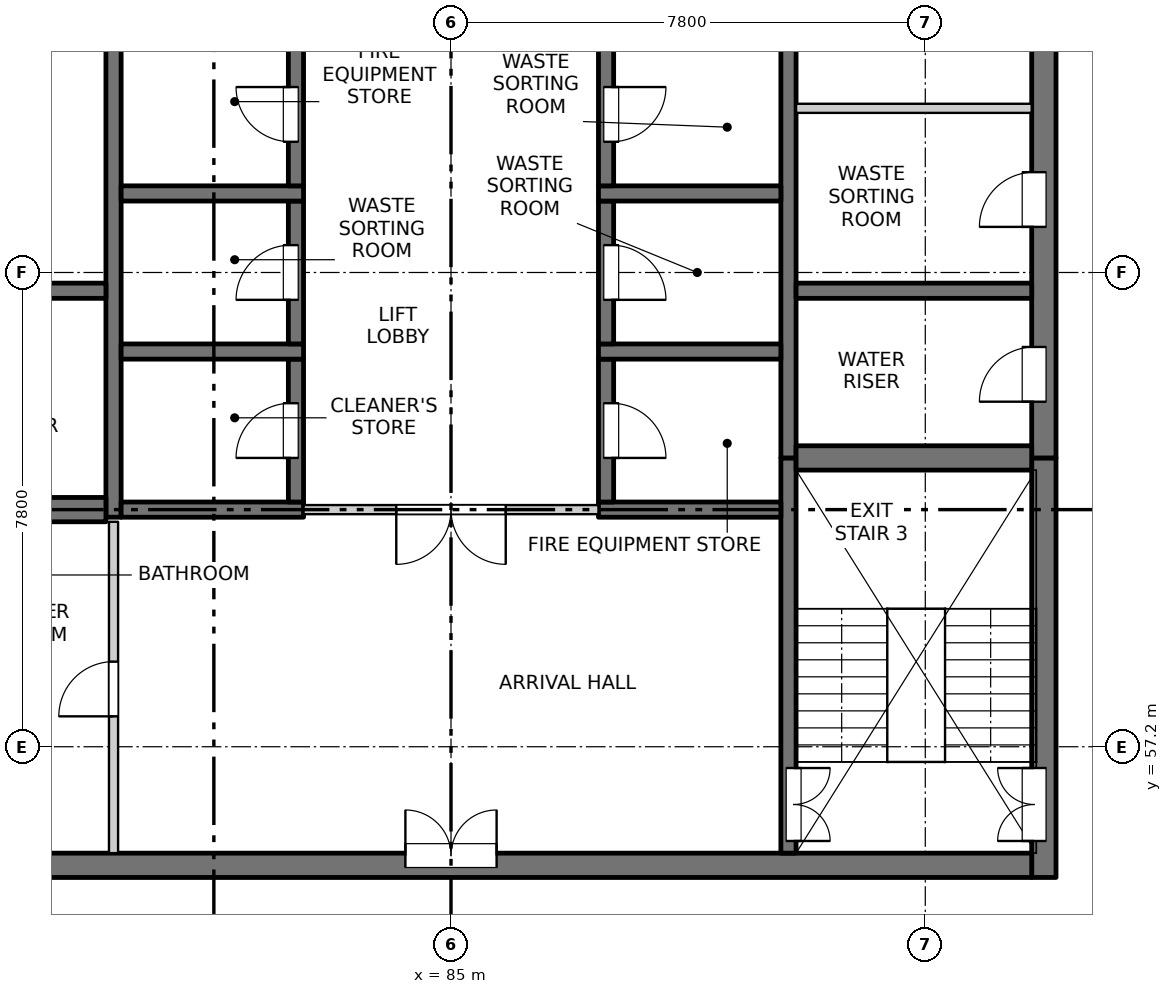
"""IFC4 building model, lengths in metres.
Left out: names, types, materials, properties, quantities, classifications, styles, units other than length and angle.
Written with IfcOpenShell. Run it as: python <this file> out.ifc"""

import sys

from ifc_helpers import new_model, si_unit, direction, frame, frame_2d, origin, place, context, subcontext, project, spatial, rectangle, extrude, element, fill, save


model = new_model("IFC4")
c1 = context("Model", 3, precision=1e-05, world=origin(), true_north=direction((0.0, 1.0)))
c2 = subcontext(c1, "Body", "Model", "MODEL_VIEW")
j1 = project(units=[si_unit("LENGTHUNIT", "METRE"), si_unit("PLANEANGLEUNIT", "RADIAN")], contexts=[c1])
p1 = place(None, origin())
s1 = spatial("IfcSite", under=j1, at=p1, CompositionType="ELEMENT")
p2 = place(p1, origin())
s2 = spatial("IfcBuilding", under=s1, at=p2, CompositionType="ELEMENT")
p3 = place(p2, frame((0.0, 0.0, 214.3)))
s3 = spatial("IfcBuildingStorey", under=s2, at=p3, CompositionType="ELEMENT", Elevation=214.3)
p4 = place(p3, frame((94.75, 55.05, -0.25), z_axis=(0.0, 0.0, 1.0), x_axis=(0.0, 1.0, 0.0)))
e1 = element("IfcWall", 1, at=p4, inside=s3, PredefinedType="SOLIDWALL", context=c2, shape_type="SweptSolid", body=[
    extrude(rectangle(XDim=6.9, YDim=0.4, at=frame_2d((3.45, 0.0))), origin(), (0.0, 0.0, 1.0), 3.4),
])
p5 = place(p4, frame((0.6, 0.0, 0.25)))
e2 = element("IfcOpeningElement", 2, at=p5, cuts=e1, PredefinedType="OPENING", context=c2, shape_type="SweptSolid", body=[
    extrude(rectangle(XDim=1.2, YDim=2.1, at=frame_2d((0.6, 1.05))), frame((0.0, 0.21, 0.0), z_axis=(0.0, -1.0, 0.0), x_axis=(1.0, 0.0, 0.0)), (0.0, 0.0, 1.0), 0.42),
])
p6 = place(p3, frame((94.75, 61.95, -0.25), z_axis=(0.0, 0.0, 1.0), x_axis=(0.0, 1.0, 0.0)))
e3 = element("IfcWall", 3, at=p6, inside=s3, PredefinedType="SOLIDWALL", context=c2, shape_type="SweptSolid", body=[
    extrude(rectangle(XDim=15.35, YDim=0.4, at=frame_2d((7.675, 0.0))), origin(), (0.0, 0.0, 1.0), 3.4),
])
p7 = place(p6, frame((0.925, 0.0, 0.25)))
e4 = element("IfcOpeningElement", 4, at=p7, cuts=e3, PredefinedType="OPENING", context=c2, shape_type="SweptSolid", body=[
    extrude(rectangle(XDim=0.9, YDim=2.1, at=frame_2d((0.45, 1.05))), frame((0.0, 0.21, 0.0), z_axis=(0.0, -1.0, 0.0), x_axis=(1.0, 0.0, 0.0)), (0.0, 0.0, 1.0), 0.42),
])
p8 = place(p6, frame((3.8, 0.0, 0.25)))
e5 = element("IfcOpeningElement", 5, at=p8, cuts=e3, PredefinedType="OPENING", context=c2, shape_type="SweptSolid", body=[
    extrude(rectangle(XDim=0.9, YDim=2.1, at=frame_2d((0.45, 1.05))), frame((0.0, 0.21, 0.0), z_axis=(0.0, -1.0, 0.0), x_axis=(1.0, 0.0, 0.0)), (0.0, 0.0, 1.0), 0.42),
])
p9 = place(p6, frame((8.3, 0.0, 0.25)))
e6 = element("IfcOpeningElement", 6, at=p9, cuts=e3, PredefinedType="OPENING", context=c2, shape_type="SweptSolid", body=[
    extrude(rectangle(XDim=0.9, YDim=2.1, at=frame_2d((0.45, 1.05))), frame((0.0, 0.21, 0.0), z_axis=(0.0, -1.0, 0.0), x_axis=(1.0, 0.0, 0.0)), (0.0, 0.0, 1.0), 0.42),
])
p10 = place(p6, frame((13.1, 0.0, 0.25)))
e7 = element("IfcOpeningElement", 7, at=p10, cuts=e3, PredefinedType="OPENING", context=c2, shape_type="SweptSolid", body=[
    extrude(rectangle(XDim=0.9, YDim=2.1, at=frame_2d((0.45, 1.05))), frame((0.0, 0.21, 0.0), z_axis=(0.0, -1.0, 0.0), x_axis=(1.0, 0.0, 0.0)), (0.0, 0.0, 1.0), 0.42),
])
p11 = place(p3, frame((75.45, 55.25, -0.25), z_axis=(0.0, 0.0, 1.0), x_axis=(1.0, 0.0, 0.0)))
e8 = element("IfcWall", 8, at=p11, inside=s3, PredefinedType="SOLIDWALL", context=c2, shape_type="SweptSolid", body=[
    extrude(rectangle(XDim=19.1, YDim=0.4, at=frame_2d((9.55, 0.0))), origin(), (0.0, 0.0, 1.0), 3.4),
])
p12 = place(p11, frame((8.8, 0.0, 0.25)))
e9 = element("IfcOpeningElement", 9, at=p12, cuts=e8, PredefinedType="OPENING", context=c2, shape_type="SweptSolid", body=[
    extrude(rectangle(XDim=1.5, YDim=2.1, at=frame_2d((0.75, 1.05))), frame((0.0, 0.21, 0.0), z_axis=(0.0, -1.0, 0.0), x_axis=(1.0, 0.0, 0.0)), (0.0, 0.0, 1.0), 0.42),
])
p13 = place(p3, frame((79.45, 60.975, -0.25), z_axis=(0.0, 0.0, 1.0), x_axis=(0.0, 1.0, 0.0)))
e10 = element("IfcWall", 10, at=p13, inside=s3, PredefinedType="SOLIDWALL", context=c2, shape_type="SweptSolid", body=[
    extrude(rectangle(XDim=16.325, YDim=0.25, at=frame_2d((8.163, 0.0))), origin(), (0.0, 0.0, 1.0), 3.4),
])
p14 = place(p3, frame((90.55, 55.45, -0.25), z_axis=(0.0, 0.0, 1.0), x_axis=(0.0, 1.0, 0.0)))
e11 = element("IfcWall", 11, at=p14, inside=s3, PredefinedType="SOLIDWALL", context=c2, shape_type="SweptSolid", body=[
    extrude(rectangle(XDim=6.5, YDim=0.25, at=frame_2d((3.25, 0.0))), origin(), (0.0, 0.0, 1.0), 3.4),
])
p15 = place(p14, frame((0.2, 0.0, 0.25)))
e12 = element("IfcOpeningElement", 12, at=p15, cuts=e11, PredefinedType="OPENING", context=c2, shape_type="SweptSolid", body=[
    extrude(rectangle(XDim=1.2, YDim=2.1, at=frame_2d((0.6, 1.05))), frame((0.0, 0.135, 0.0), z_axis=(0.0, -1.0, 0.0), x_axis=(1.0, 0.0, 0.0)), (0.0, 0.0, 1.0), 0.27),
])
p16 = place(p3, frame((90.55, 61.95, -0.25), z_axis=(0.0, 0.0, 1.0), x_axis=(0.0, 1.0, 0.0)))
e13 = element("IfcWall", 13, at=p16, inside=s3, PredefinedType="SOLIDWALL", context=c2, shape_type="SweptSolid", body=[
    extrude(rectangle(XDim=15.35, YDim=0.25, at=frame_2d((7.675, 0.0))), origin(), (0.0, 0.0, 1.0), 3.4),
])
p17 = place(p3, frame((79.575, 61.1, -0.25), z_axis=(0.0, 0.0, 1.0), x_axis=(1.0, 0.0, 0.0)))
e14 = element("IfcWall", 14, at=p17, inside=s3, PredefinedType="SOLIDWALL", context=c2, shape_type="SweptSolid", body=[
    extrude(rectangle(XDim=3.0, YDim=0.25, at=frame_2d((1.5, 0.0))), origin(), (0.0, 0.0, 1.0), 3.4),
])
p18 = place(p3, frame((82.45, 61.225, -0.25), z_axis=(0.0, 0.0, 1.0), x_axis=(0.0, 1.0, 0.0)))
e15 = element("IfcWall", 15, at=p18, inside=s3, PredefinedType="SOLIDWALL", context=c2, shape_type="SweptSolid", body=[
    extrude(rectangle(XDim=2.35, YDim=0.25, at=frame_2d((1.175, 0.0))), origin(), (0.0, 0.0, 1.0), 3.4),
])
p19 = place(p18, frame((0.725, 0.0, 0.25)))
e16 = element("IfcOpeningElement", 16, at=p19, cuts=e15, PredefinedType="OPENING", context=c2, shape_type="SweptSolid", body=[
    extrude(rectangle(XDim=0.9, YDim=2.1, at=frame_2d((0.45, 1.05))), frame((0.0, 0.135, 0.0), z_axis=(0.0, -1.0, 0.0), x_axis=(1.0, 0.0, 0.0)), (0.0, 0.0, 1.0), 0.27),
])
p20 = place(p3, frame((79.575, 63.7, -0.25), z_axis=(0.0, 0.0, 1.0), x_axis=(1.0, 0.0, 0.0)))
e17 = element("IfcWall", 17, at=p20, inside=s3, PredefinedType="SOLIDWALL", context=c2, shape_type="SweptSolid", body=[
    extrude(rectangle(XDim=3.0, YDim=0.25, at=frame_2d((1.5, 0.0))), origin(), (0.0, 0.0, 1.0), 3.4),
])
p21 = place(p3, frame((82.45, 63.825, -0.25), z_axis=(0.0, 0.0, 1.0), x_axis=(0.0, 1.0, 0.0)))
e18 = element("IfcWall", 18, at=p21, inside=s3, PredefinedType="SOLIDWALL", context=c2, shape_type="SweptSolid", body=[
    extrude(rectangle(XDim=2.35, YDim=0.25, at=frame_2d((1.175, 0.0))), origin(), (0.0, 0.0, 1.0), 3.4),
])
p22 = place(p21, frame((0.725, 0.0, 0.25)))
e19 = element("IfcOpeningElement", 19, at=p22, cuts=e18, PredefinedType="OPENING", context=c2, shape_type="SweptSolid", body=[
    extrude(rectangle(XDim=0.9, YDim=2.1, at=frame_2d((0.45, 1.05))), frame((0.0, 0.135, 0.0), z_axis=(0.0, -1.0, 0.0), x_axis=(1.0, 0.0, 0.0)), (0.0, 0.0, 1.0), 0.27),
])
p23 = place(p3, frame((79.575, 66.3, -0.25), z_axis=(0.0, 0.0, 1.0), x_axis=(1.0, 0.0, 0.0)))
e20 = element("IfcWall", 20, at=p23, inside=s3, PredefinedType="SOLIDWALL", context=c2, shape_type="SweptSolid", body=[
    extrude(rectangle(XDim=3.0, YDim=0.25, at=frame_2d((1.5, 0.0))), origin(), (0.0, 0.0, 1.0), 3.4),
])
p24 = place(p3, frame((82.45, 66.425, -0.25), z_axis=(0.0, 0.0, 1.0), x_axis=(0.0, 1.0, 0.0)))
e21 = element("IfcWall", 21, at=p24, inside=s3, PredefinedType="SOLIDWALL", context=c2, shape_type="SweptSolid", body=[
    extrude(rectangle(XDim=2.35, YDim=0.25, at=frame_2d((1.175, 0.0))), origin(), (0.0, 0.0, 1.0), 3.4),
])
p25 = place(p24, frame((0.725, 0.0, 0.25)))
e22 = element("IfcOpeningElement", 22, at=p25, cuts=e21, PredefinedType="OPENING", context=c2, shape_type="SweptSolid", body=[
    extrude(rectangle(XDim=0.9, YDim=2.1, at=frame_2d((0.45, 1.05))), frame((0.0, 0.135, 0.0), z_axis=(0.0, -1.0, 0.0), x_axis=(1.0, 0.0, 0.0)), (0.0, 0.0, 1.0), 0.27),
])
p26 = place(p3, frame((87.425, 61.1, -0.25), z_axis=(0.0, 0.0, 1.0), x_axis=(1.0, 0.0, 0.0)))
e23 = element("IfcWall", 23, at=p26, inside=s3, PredefinedType="SOLIDWALL", context=c2, shape_type="SweptSolid", body=[
    extrude(rectangle(XDim=3.0, YDim=0.25, at=frame_2d((1.5, 0.0))), origin(), (0.0, 0.0, 1.0), 3.4),
])
p27 = place(p3, frame((87.55, 61.225, -0.25), z_axis=(0.0, 0.0, 1.0), x_axis=(0.0, 1.0, 0.0)))
e24 = element("IfcWall", 24, at=p27, inside=s3, PredefinedType="SOLIDWALL", context=c2, shape_type="SweptSolid", body=[
    extrude(rectangle(XDim=2.35, YDim=0.25, at=frame_2d((1.175, 0.0))), origin(), (0.0, 0.0, 1.0), 3.4),
])
p28 = place(p27, frame((0.725, 0.0, 0.25)))
e25 = element("IfcOpeningElement", 25, at=p28, cuts=e24, PredefinedType="OPENING", context=c2, shape_type="SweptSolid", body=[
    extrude(rectangle(XDim=0.9, YDim=2.1, at=frame_2d((0.45, 1.05))), frame((0.0, 0.135, 0.0), z_axis=(0.0, -1.0, 0.0), x_axis=(1.0, 0.0, 0.0)), (0.0, 0.0, 1.0), 0.27),
])
p29 = place(p3, frame((87.425, 63.7, -0.25), z_axis=(0.0, 0.0, 1.0), x_axis=(1.0, 0.0, 0.0)))
e26 = element("IfcWall", 26, at=p29, inside=s3, PredefinedType="SOLIDWALL", context=c2, shape_type="SweptSolid", body=[
    extrude(rectangle(XDim=3.0, YDim=0.25, at=frame_2d((1.5, 0.0))), origin(), (0.0, 0.0, 1.0), 3.4),
])
p30 = place(p3, frame((87.55, 63.825, -0.25), z_axis=(0.0, 0.0, 1.0), x_axis=(0.0, 1.0, 0.0)))
e27 = element("IfcWall", 27, at=p30, inside=s3, PredefinedType="SOLIDWALL", context=c2, shape_type="SweptSolid", body=[
    extrude(rectangle(XDim=2.35, YDim=0.25, at=frame_2d((1.175, 0.0))), origin(), (0.0, 0.0, 1.0), 3.4),
])
p31 = place(p30, frame((0.725, 0.0, 0.25)))
e28 = element("IfcOpeningElement", 28, at=p31, cuts=e27, PredefinedType="OPENING", context=c2, shape_type="SweptSolid", body=[
    extrude(rectangle(XDim=0.9, YDim=2.1, at=frame_2d((0.45, 1.05))), frame((0.0, 0.135, 0.0), z_axis=(0.0, -1.0, 0.0), x_axis=(1.0, 0.0, 0.0)), (0.0, 0.0, 1.0), 0.27),
])
p32 = place(p3, frame((87.425, 66.3, -0.25), z_axis=(0.0, 0.0, 1.0), x_axis=(1.0, 0.0, 0.0)))
e29 = element("IfcWall", 29, at=p32, inside=s3, PredefinedType="SOLIDWALL", context=c2, shape_type="SweptSolid", body=[
    extrude(rectangle(XDim=3.0, YDim=0.25, at=frame_2d((1.5, 0.0))), origin(), (0.0, 0.0, 1.0), 3.4),
])
p33 = place(p3, frame((87.55, 66.425, -0.25), z_axis=(0.0, 0.0, 1.0), x_axis=(0.0, 1.0, 0.0)))
e30 = element("IfcWall", 30, at=p33, inside=s3, PredefinedType="SOLIDWALL", context=c2, shape_type="SweptSolid", body=[
    extrude(rectangle(XDim=2.35, YDim=0.25, at=frame_2d((1.175, 0.0))), origin(), (0.0, 0.0, 1.0), 3.4),
])
p34 = place(p33, frame((0.725, 0.0, 0.25)))
e31 = element("IfcOpeningElement", 31, at=p34, cuts=e30, PredefinedType="OPENING", context=c2, shape_type="SweptSolid", body=[
    extrude(rectangle(XDim=0.9, YDim=2.1, at=frame_2d((0.45, 1.05))), frame((0.0, 0.135, 0.0), z_axis=(0.0, -1.0, 0.0), x_axis=(1.0, 0.0, 0.0)), (0.0, 0.0, 1.0), 0.27),
])
p35 = place(p3, frame((75.45, 61.1, -0.25), z_axis=(0.0, 0.0, 1.0), x_axis=(1.0, 0.0, 0.0)))
e32 = element("IfcWall", 32, at=p35, inside=s3, PredefinedType="SOLIDWALL", context=c2, shape_type="SweptSolid", body=[
    extrude(rectangle(XDim=3.875, YDim=0.4, at=frame_2d((1.938, 0.0))), origin(), (0.0, 0.0, 1.0), 3.4),
])
p36 = place(p3, frame((75.45, 64.7, -0.25), z_axis=(0.0, 0.0, 1.0), x_axis=(1.0, 0.0, 0.0)))
e33 = element("IfcWall", 33, at=p36, inside=s3, PredefinedType="SOLIDWALL", context=c2, shape_type="SweptSolid", body=[
    extrude(rectangle(XDim=3.875, YDim=0.25, at=frame_2d((1.938, 0.0))), origin(), (0.0, 0.0, 1.0), 3.4),
])
p37 = place(p3, frame((90.675, 61.95, -0.25), z_axis=(0.0, 0.0, 1.0), x_axis=(1.0, 0.0, 0.0)))
e34 = element("IfcWall", 34, at=p37, inside=s3, PredefinedType="SOLIDWALL", context=c2, shape_type="SweptSolid", body=[
    extrude(rectangle(XDim=3.875, YDim=0.4, at=frame_2d((1.938, 0.0))), origin(), (0.0, 0.0, 1.0), 3.4),
])
p38 = place(p3, frame((90.675, 64.7, -0.25), z_axis=(0.0, 0.0, 1.0), x_axis=(1.0, 0.0, 0.0)))
e35 = element("IfcWall", 35, at=p38, inside=s3, PredefinedType="SOLIDWALL", context=c2, shape_type="SweptSolid", body=[
    extrude(rectangle(XDim=3.875, YDim=0.25, at=frame_2d((1.938, 0.0))), origin(), (0.0, 0.0, 1.0), 3.4),
])
p39 = place(p3, frame((82.575, 61.1, 0.0), z_axis=(0.0, 0.0, 1.0), x_axis=(1.0, 0.0, 0.0)))
e36 = element("IfcWall", 36, at=p39, inside=s3, PredefinedType="PARTITIONING", context=c2, shape_type="SweptSolid", body=[
    extrude(rectangle(XDim=4.85, YDim=0.15, at=frame_2d((2.425, 0.0))), origin(), (0.0, 0.0, 1.0), 3.15),
])
p40 = place(p39, frame((1.525, 0.0, 0.0)))
e37 = element("IfcOpeningElement", 37, at=p40, cuts=e36, PredefinedType="OPENING", context=c2, shape_type="SweptSolid", body=[
    extrude(rectangle(XDim=1.8, YDim=2.1, at=frame_2d((0.9, 1.05))), frame((0.0, 0.085, 0.0), z_axis=(0.0, -1.0, 0.0), x_axis=(1.0, 0.0, 0.0)), (0.0, 0.0, 1.0), 0.17),
])
p41 = place(p3, frame((90.675, 67.7, 0.0), z_axis=(0.0, 0.0, 1.0), x_axis=(1.0, 0.0, 0.0)))
e38 = element("IfcWall", 38, at=p41, inside=s3, PredefinedType="PARTITIONING", context=c2, shape_type="SweptSolid", body=[
    extrude(rectangle(XDim=3.875, YDim=0.15, at=frame_2d((1.938, 0.0))), origin(), (0.0, 0.0, 1.0), 3.15),
])
p42 = place(p3, frame((79.45, 55.45, 0.0), z_axis=(0.0, 0.0, 1.0), x_axis=(0.0, 1.0, 0.0)))
e39 = element("IfcWall", 39, at=p42, inside=s3, PredefinedType="PARTITIONING", context=c2, shape_type="SweptSolid", body=[
    extrude(rectangle(XDim=5.45, YDim=0.15, at=frame_2d((2.725, 0.0))), origin(), (0.0, 0.0, 1.0), 3.15),
])
p43 = place(p42, frame((2.25, 0.0, 0.0)))
e40 = element("IfcOpeningElement", 40, at=p43, cuts=e39, PredefinedType="OPENING", context=c2, shape_type="SweptSolid", body=[
    extrude(rectangle(XDim=0.9, YDim=2.1, at=frame_2d((0.45, 1.05))), frame((0.0, 0.085, 0.0), z_axis=(0.0, -1.0, 0.0), x_axis=(1.0, 0.0, 0.0)), (0.0, 0.0, 1.0), 0.17),
])
p44 = place(p12, origin())
e41 = element("IfcDoor", 41, at=p44, inside=s3, OperationType="DOUBLE_DOOR_SINGLE_SWING", PredefinedType="DOOR", context=c2, shape_type="SweptSolid", body=[
    extrude(rectangle(XDim=1.5, YDim=2.1, at=frame_2d((0.75, 1.05))), frame((0.0, 0.185, 0.0), z_axis=(0.0, -1.0, 0.0), x_axis=(1.0, 0.0, 0.0)), (0.0, 0.0, 1.0), 0.05),
])
fill(e9, e41)
p45 = place(p15, origin())
e42 = element("IfcDoor", 42, at=p45, inside=s3, OperationType="DOUBLE_DOOR_SINGLE_SWING", PredefinedType="DOOR", context=c2, shape_type="SweptSolid", body=[
    extrude(rectangle(XDim=1.2, YDim=2.1, at=frame_2d((0.6, 1.05))), frame((0.0, -0.06, 0.0), z_axis=(0.0, -1.0, 0.0), x_axis=(1.0, 0.0, 0.0)), (0.0, 0.0, 1.0), 0.05),
])
fill(e12, e42)
p46 = place(p5, origin())
e43 = element("IfcDoor", 43, at=p46, inside=s3, OperationType="DOUBLE_DOOR_SINGLE_SWING", PredefinedType="DOOR", context=c2, shape_type="SweptSolid", body=[
    extrude(rectangle(XDim=1.2, YDim=2.1, at=frame_2d((0.6, 1.05))), frame((0.0, 0.185, 0.0), z_axis=(0.0, -1.0, 0.0), x_axis=(1.0, 0.0, 0.0)), (0.0, 0.0, 1.0), 0.05),
])
fill(e2, e43)
p47 = place(p43, origin())
e44 = element("IfcDoor", 44, at=p47, inside=s3, OperationType="SINGLE_SWING_LEFT", PredefinedType="DOOR", context=c2, shape_type="SweptSolid", body=[
    extrude(rectangle(XDim=0.9, YDim=2.1, at=frame_2d((0.45, 1.05))), frame((0.0, 0.025, 0.0), z_axis=(0.0, -1.0, 0.0), x_axis=(1.0, 0.0, 0.0)), (0.0, 0.0, 1.0), 0.05),
])
fill(e40, e44)
p48 = place(p40, origin())
e45 = element("IfcDoor", 45, at=p48, inside=s3, OperationType="DOUBLE_DOOR_SINGLE_SWING", PredefinedType="DOOR", context=c2, shape_type="SweptSolid", body=[
    extrude(rectangle(XDim=1.8, YDim=2.1, at=frame_2d((0.9, 1.05))), frame((0.0, 0.025, 0.0), z_axis=(0.0, -1.0, 0.0), x_axis=(1.0, 0.0, 0.0)), (0.0, 0.0, 1.0), 0.05),
])
fill(e37, e45)
p49 = place(p19, origin())
e46 = element("IfcDoor", 46, at=p49, inside=s3, OperationType="SINGLE_SWING_LEFT", PredefinedType="DOOR", context=c2, shape_type="SweptSolid", body=[
    extrude(rectangle(XDim=0.9, YDim=2.1, at=frame_2d((0.45, 1.05))), frame((0.0, 0.11, 0.0), z_axis=(0.0, -1.0, 0.0), x_axis=(1.0, 0.0, 0.0)), (0.0, 0.0, 1.0), 0.05),
])
fill(e16, e46)
p50 = place(p28, origin())
e47 = element("IfcDoor", 47, at=p50, inside=s3, OperationType="SINGLE_SWING_RIGHT", PredefinedType="DOOR", context=c2, shape_type="SweptSolid", body=[
    extrude(rectangle(XDim=0.9, YDim=2.1, at=frame_2d((0.45, 1.05))), frame((0.0, -0.06, 0.0), z_axis=(0.0, -1.0, 0.0), x_axis=(1.0, 0.0, 0.0)), (0.0, 0.0, 1.0), 0.05),
])
fill(e25, e47)
p51 = place(p7, origin())
e48 = element("IfcDoor", 48, at=p51, inside=s3, OperationType="SINGLE_SWING_LEFT", PredefinedType="DOOR", context=c2, shape_type="SweptSolid", body=[
    extrude(rectangle(XDim=0.9, YDim=2.1, at=frame_2d((0.45, 1.05))), frame((0.0, 0.185, 0.0), z_axis=(0.0, -1.0, 0.0), x_axis=(1.0, 0.0, 0.0)), (0.0, 0.0, 1.0), 0.05),
])
fill(e4, e48)
p52 = place(p22, origin())
e49 = element("IfcDoor", 49, at=p52, inside=s3, OperationType="SINGLE_SWING_LEFT", PredefinedType="DOOR", context=c2, shape_type="SweptSolid", body=[
    extrude(rectangle(XDim=0.9, YDim=2.1, at=frame_2d((0.45, 1.05))), frame((0.0, 0.11, 0.0), z_axis=(0.0, -1.0, 0.0), x_axis=(1.0, 0.0, 0.0)), (0.0, 0.0, 1.0), 0.05),
])
fill(e19, e49)
p53 = place(p31, origin())
e50 = element("IfcDoor", 50, at=p53, inside=s3, OperationType="SINGLE_SWING_RIGHT", PredefinedType="DOOR", context=c2, shape_type="SweptSolid", body=[
    extrude(rectangle(XDim=0.9, YDim=2.1, at=frame_2d((0.45, 1.05))), frame((0.0, -0.06, 0.0), z_axis=(0.0, -1.0, 0.0), x_axis=(1.0, 0.0, 0.0)), (0.0, 0.0, 1.0), 0.05),
])
fill(e28, e50)
p54 = place(p8, origin())
e51 = element("IfcDoor", 51, at=p54, inside=s3, OperationType="SINGLE_SWING_LEFT", PredefinedType="DOOR", context=c2, shape_type="SweptSolid", body=[
    extrude(rectangle(XDim=0.9, YDim=2.1, at=frame_2d((0.45, 1.05))), frame((0.0, 0.185, 0.0), z_axis=(0.0, -1.0, 0.0), x_axis=(1.0, 0.0, 0.0)), (0.0, 0.0, 1.0), 0.05),
])
fill(e5, e51)
p55 = place(p25, origin())
e52 = element("IfcDoor", 52, at=p55, inside=s3, OperationType="SINGLE_SWING_RIGHT", PredefinedType="DOOR", context=c2, shape_type="SweptSolid", body=[
    extrude(rectangle(XDim=0.9, YDim=2.1, at=frame_2d((0.45, 1.05))), frame((0.0, 0.11, 0.0), z_axis=(0.0, -1.0, 0.0), x_axis=(1.0, 0.0, 0.0)), (0.0, 0.0, 1.0), 0.05),
])
fill(e22, e52)
p56 = place(p34, origin())
e53 = element("IfcDoor", 53, at=p56, inside=s3, OperationType="SINGLE_SWING_LEFT", PredefinedType="DOOR", context=c2, shape_type="SweptSolid", body=[
    extrude(rectangle(XDim=0.9, YDim=2.1, at=frame_2d((0.45, 1.05))), frame((0.0, -0.06, 0.0), z_axis=(0.0, -1.0, 0.0), x_axis=(1.0, 0.0, 0.0)), (0.0, 0.0, 1.0), 0.05),
])
fill(e31, e53)
save(model, sys.argv[1])
